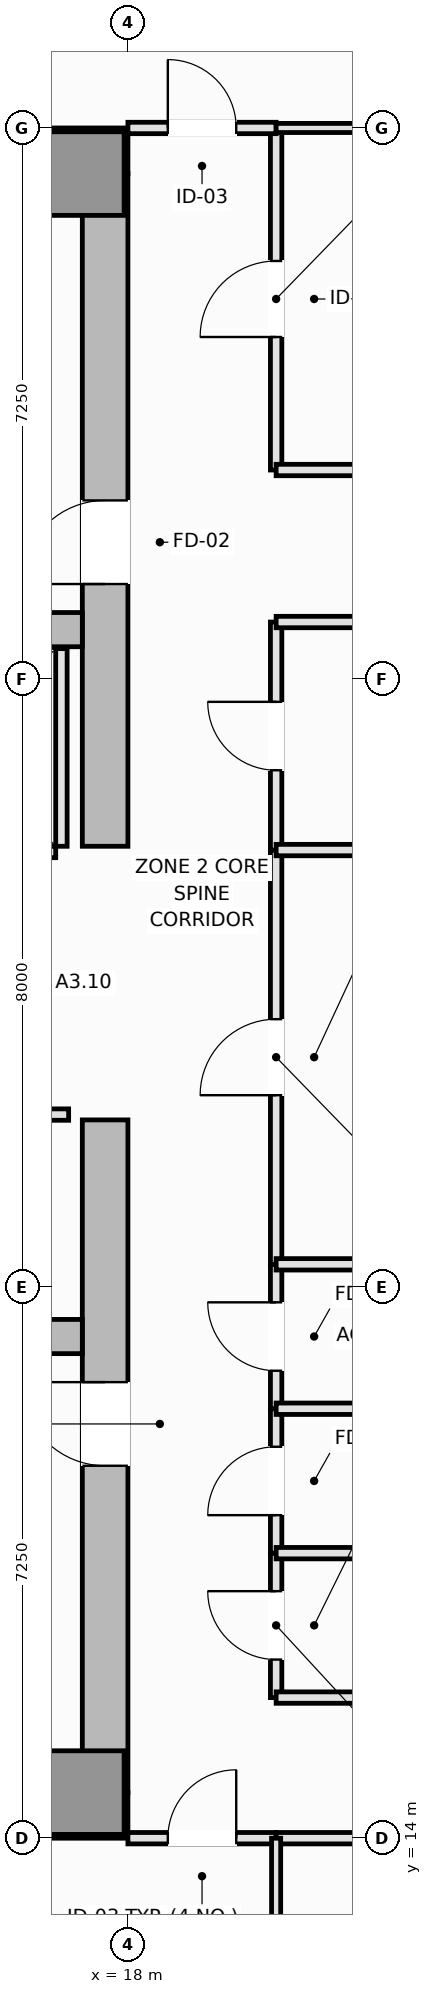
"""IFC4 building model, lengths in metres.
Left out: names, types, materials, properties, quantities, classifications, styles, units other than length and angle.
Written with IfcOpenShell. Run it as: python <this file> out.ifc"""

import sys

from ifc_helpers import new_model, si_unit, direction, frame, frame_2d, origin, origin_2d, place, context, subcontext, project, spatial, rectangle, extrude, element, fill, save


model = new_model("IFC4")
c1 = context("Model", 3, precision=1e-05, world=origin(), true_north=direction((0.0, 1.0)))
c2 = subcontext(c1, "Body", "Model", "MODEL_VIEW")
j1 = project(units=[si_unit("LENGTHUNIT", "METRE"), si_unit("PLANEANGLEUNIT", "RADIAN")], contexts=[c1])
p1 = place(None, origin())
s1 = spatial("IfcSite", under=j1, at=p1, CompositionType="ELEMENT")
p2 = place(p1, origin())
s2 = spatial("IfcBuilding", under=s1, at=p2, CompositionType="ELEMENT")
p3 = place(p2, frame((0.0, 0.0, 148.4)))
s3 = spatial("IfcBuildingStorey", under=s2, at=p3, CompositionType="ELEMENT", Elevation=148.4)
for number, where, z_axis, x_axis in (
    (1, (4.5, 14.3, 0.0), (0.0, 0.0, 1.0), (1.0, 0.0, 0.0)),
    (2, (4.5, 36.2, 0.0), (0.0, 0.0, 1.0), (1.0, 0.0, 0.0)),
):
    element("IfcWall", number, at=place(p3, frame(where, z_axis=z_axis, x_axis=x_axis)), inside=s3, PredefinedType="SHEAR", context=c2, shape_type="SweptSolid", body=[
        extrude(rectangle(XDim=13.5, YDim=0.6, at=frame_2d((6.75, 0.0))), origin(), (0.0, 0.0, 1.0), 3.55),
    ])
p4 = place(p3, frame((17.7, 14.6, 0.0), z_axis=(0.0, 0.0, 1.0), x_axis=(0.0, 1.0, 0.0)))
e3 = element("IfcWall", 3, at=p4, inside=s3, PredefinedType="SHEAR", context=c2, shape_type="SweptSolid", body=[
    extrude(rectangle(XDim=8.85, YDim=0.6, at=frame_2d((4.425, 0.0))), origin(), (0.0, 0.0, 1.0), 3.55),
])
p5 = place(p4, frame((4.3, 0.0, 0.0)))
e4 = element("IfcOpeningElement", 4, at=p5, cuts=e3, PredefinedType="OPENING", context=c2, shape_type="SweptSolid", body=[
    extrude(rectangle(XDim=1.1, YDim=2.15, at=frame_2d((0.55, 1.075))), frame((0.0, 0.31, 0.0), z_axis=(0.0, -1.0, 0.0), x_axis=(1.0, 0.0, 0.0)), (0.0, 0.0, 1.0), 0.62),
])
p6 = place(p3, frame((17.7, 27.05, 0.0), z_axis=(0.0, 0.0, 1.0), x_axis=(0.0, 1.0, 0.0)))
e5 = element("IfcWall", 5, at=p6, inside=s3, PredefinedType="SHEAR", context=c2, shape_type="SweptSolid", body=[
    extrude(rectangle(XDim=8.85, YDim=0.6, at=frame_2d((4.425, 0.0))), origin(), (0.0, 0.0, 1.0), 3.55),
])
p7 = place(p6, frame((3.45, 0.0, 0.0)))
e6 = element("IfcOpeningElement", 6, at=p7, cuts=e5, PredefinedType="OPENING", context=c2, shape_type="SweptSolid", body=[
    extrude(rectangle(XDim=1.1, YDim=2.15, at=frame_2d((0.55, 1.075))), frame((0.0, 0.31, 0.0), z_axis=(0.0, -1.0, 0.0), x_axis=(1.0, 0.0, 0.0)), (0.0, 0.0, 1.0), 0.62),
])
for number, where, z_axis, x_axis in (
    (7, (5.1, 20.6, 0.0), (0.0, 0.0, 1.0), (1.0, 0.0, 0.0)),
    (8, (5.1, 29.9, 0.0), (0.0, 0.0, 1.0), (1.0, 0.0, 0.0)),
):
    element("IfcWall", number, at=place(p3, frame(where, z_axis=z_axis, x_axis=x_axis)), inside=s3, PredefinedType="SHEAR", context=c2, shape_type="SweptSolid", body=[
        extrude(rectangle(XDim=12.3, YDim=0.45, at=frame_2d((6.15, 0.0))), origin(), (0.0, 0.0, 1.0), 3.55),
    ])
for number, where, z_axis, x_axis in (
    (9, (17.4, 14.6, 0.0), (0.0, 0.0, 1.0), (1.0, 0.0, 0.0)),
    (10, (17.4, 35.9, 0.0), (0.0, 0.0, 1.0), (1.0, 0.0, 0.0)),
):
    element("IfcColumn", number, at=place(p3, frame(where, z_axis=z_axis, x_axis=x_axis)), inside=s3, PredefinedType="PILASTER", context=c2, shape_type="SweptSolid", body=[
        extrude(rectangle(XDim=1.1, YDim=1.1, at=origin_2d()), origin(), (0.0, 0.0, 1.0), 3.55),
    ])
p8 = place(p3, frame((14.5, 26.975, 0.0), z_axis=(0.0, 0.0, 1.0), x_axis=(1.0, 0.0, 0.0)))
e11 = element("IfcWall", 11, at=p8, inside=s3, PredefinedType="PARTITIONING", context=c2, shape_type="SweptSolid", body=[
    extrude(rectangle(XDim=2.55, YDim=0.15, at=frame_2d((1.275, 0.0))), origin(), (0.0, 0.0, 1.0), 3.37),
])
p9 = place(p8, frame((0.625, 0.0, 0.0)))
e12 = element("IfcOpeningElement", 12, at=p9, cuts=e11, PredefinedType="OPENING", context=c2, shape_type="SweptSolid", body=[
    extrude(rectangle(XDim=1.3, YDim=2.2, at=frame_2d((0.65, 1.1))), frame((0.0, 0.085, 0.0), z_axis=(0.0, -1.0, 0.0), x_axis=(1.0, 0.0, 0.0)), (0.0, 0.0, 1.0), 0.17),
])
p10 = place(p3, frame((17.125, 27.05, 0.0), z_axis=(0.0, 0.0, 1.0), x_axis=(0.0, 1.0, 0.0)))
e13 = element("IfcWall", 13, at=p10, inside=s3, PredefinedType="PARTITIONING", context=c2, shape_type="SweptSolid", body=[
    extrude(rectangle(XDim=2.6, YDim=0.15, at=frame_2d((1.3, 0.0))), origin(), (0.0, 0.0, 1.0), 3.37),
])
p11 = place(p3, frame((14.33, 23.52, 0.0), z_axis=(0.0, 0.0, 1.0), x_axis=(1.0, 0.0, 0.0)))
e14 = element("IfcWall", 14, at=p11, inside=s3, PredefinedType="PARTITIONING", context=c2, shape_type="SweptSolid", body=[
    extrude(rectangle(XDim=2.89, YDim=0.15, at=frame_2d((1.445, 0.0))), origin(), (0.0, 0.0, 1.0), 3.37),
])
p12 = place(p11, frame((1.053, 0.0, 0.0)))
e15 = element("IfcOpeningElement", 15, at=p12, cuts=e14, PredefinedType="OPENING", context=c2, shape_type="SweptSolid", body=[
    extrude(rectangle(XDim=0.9, YDim=2.1, at=frame_2d((0.45, 1.05))), frame((0.0, 0.085, 0.0), z_axis=(0.0, -1.0, 0.0), x_axis=(1.0, 0.0, 0.0)), (0.0, 0.0, 1.0), 0.17),
])
p13 = place(p3, frame((19.95, 15.85, 0.0), z_axis=(0.0, 0.0, 1.0), x_axis=(0.0, 1.0, 0.0)))
e16 = element("IfcWall", 16, at=p13, inside=s3, PredefinedType="PLUMBINGWALL", context=c2, shape_type="SweptSolid", body=[
    extrude(rectangle(XDim=1.9, YDim=0.15, at=frame_2d((0.95, 0.0))), origin(), (0.0, 0.0, 1.0), 3.37),
])
p14 = place(p13, frame((0.5, 0.0, 0.0)))
e17 = element("IfcOpeningElement", 17, at=p14, cuts=e16, PredefinedType="OPENING", context=c2, shape_type="SweptSolid", body=[
    extrude(rectangle(XDim=0.9, YDim=2.1, at=frame_2d((0.45, 1.05))), frame((0.0, 0.085, 0.0), z_axis=(0.0, -1.0, 0.0), x_axis=(1.0, 0.0, 0.0)), (0.0, 0.0, 1.0), 0.17),
])
p15 = place(p3, frame((19.95, 17.75, 0.0), z_axis=(0.0, 0.0, 1.0), x_axis=(0.0, 1.0, 0.0)))
e18 = element("IfcWall", 18, at=p15, inside=s3, PredefinedType="PLUMBINGWALL", context=c2, shape_type="SweptSolid", body=[
    extrude(rectangle(XDim=1.9, YDim=0.15, at=frame_2d((0.95, 0.0))), origin(), (0.0, 0.0, 1.0), 3.37),
])
p16 = place(p15, frame((0.5, 0.0, 0.0)))
e19 = element("IfcOpeningElement", 19, at=p16, cuts=e18, PredefinedType="OPENING", context=c2, shape_type="SweptSolid", body=[
    extrude(rectangle(XDim=0.9, YDim=2.1, at=frame_2d((0.45, 1.05))), frame((0.0, 0.085, 0.0), z_axis=(0.0, -1.0, 0.0), x_axis=(1.0, 0.0, 0.0)), (0.0, 0.0, 1.0), 0.17),
])
p17 = place(p3, frame((19.95, 19.65, 0.0), z_axis=(0.0, 0.0, 1.0), x_axis=(0.0, 1.0, 0.0)))
e20 = element("IfcWall", 20, at=p17, inside=s3, PredefinedType="PLUMBINGWALL", context=c2, shape_type="SweptSolid", body=[
    extrude(rectangle(XDim=1.9, YDim=0.15, at=frame_2d((0.95, 0.0))), origin(), (0.0, 0.0, 1.0), 3.37),
])
p18 = place(p17, frame((0.5, 0.0, 0.0)))
e21 = element("IfcOpeningElement", 21, at=p18, cuts=e20, PredefinedType="OPENING", context=c2, shape_type="SweptSolid", body=[
    extrude(rectangle(XDim=0.9, YDim=2.1, at=frame_2d((0.45, 1.05))), frame((0.0, 0.085, 0.0), z_axis=(0.0, -1.0, 0.0), x_axis=(1.0, 0.0, 0.0)), (0.0, 0.0, 1.0), 0.17),
])
p19 = place(p3, frame((19.95, 21.55, 0.0), z_axis=(0.0, 0.0, 1.0), x_axis=(0.0, 1.0, 0.0)))
e22 = element("IfcWall", 22, at=p19, inside=s3, PredefinedType="PARTITIONING", context=c2, shape_type="SweptSolid", body=[
    extrude(rectangle(XDim=5.45, YDim=0.15, at=frame_2d((2.725, 0.0))), origin(), (0.0, 0.0, 1.0), 3.37),
])
p20 = place(p19, frame((2.225, 0.0, 0.0)))
e23 = element("IfcOpeningElement", 23, at=p20, cuts=e22, PredefinedType="OPENING", context=c2, shape_type="SweptSolid", body=[
    extrude(rectangle(XDim=1.0, YDim=2.15, at=frame_2d((0.5, 1.075))), frame((0.0, 0.085, 0.0), z_axis=(0.0, -1.0, 0.0), x_axis=(1.0, 0.0, 0.0)), (0.0, 0.0, 1.0), 0.17),
])
p21 = place(p3, frame((19.95, 27.0, 0.0), z_axis=(0.0, 0.0, 1.0), x_axis=(0.0, 1.0, 0.0)))
e24 = element("IfcWall", 24, at=p21, inside=s3, PredefinedType="PLUMBINGWALL", context=c2, shape_type="SweptSolid", body=[
    extrude(rectangle(XDim=3.0, YDim=0.15, at=frame_2d((1.5, 0.0))), origin(), (0.0, 0.0, 1.0), 3.37),
])
p22 = place(p21, frame((1.05, 0.0, 0.0)))
e25 = element("IfcOpeningElement", 25, at=p22, cuts=e24, PredefinedType="OPENING", context=c2, shape_type="SweptSolid", body=[
    extrude(rectangle(XDim=0.9, YDim=2.1, at=frame_2d((0.45, 1.05))), frame((0.0, 0.085, 0.0), z_axis=(0.0, -1.0, 0.0), x_axis=(1.0, 0.0, 0.0)), (0.0, 0.0, 1.0), 0.17),
])
p23 = place(p3, frame((19.95, 32.0, 0.0), z_axis=(0.0, 0.0, 1.0), x_axis=(0.0, 1.0, 0.0)))
e26 = element("IfcWall", 26, at=p23, inside=s3, PredefinedType="PARTITIONING", context=c2, shape_type="SweptSolid", body=[
    extrude(rectangle(XDim=4.5, YDim=0.15, at=frame_2d((2.25, 0.0))), origin(), (0.0, 0.0, 1.0), 3.37),
])
p24 = place(p23, frame((1.75, 0.0, 0.0)))
e27 = element("IfcOpeningElement", 27, at=p24, cuts=e26, PredefinedType="OPENING", context=c2, shape_type="SweptSolid", body=[
    extrude(rectangle(XDim=1.0, YDim=2.15, at=frame_2d((0.5, 1.075))), frame((0.0, 0.085, 0.0), z_axis=(0.0, -1.0, 0.0), x_axis=(1.0, 0.0, 0.0)), (0.0, 0.0, 1.0), 0.17),
])
p25 = place(p3, frame((18.0, 14.0, 0.0), z_axis=(0.0, 0.0, 1.0), x_axis=(1.0, 0.0, 0.0)))
e28 = element("IfcWall", 28, at=p25, inside=s3, PredefinedType="PARTITIONING", context=c2, shape_type="SweptSolid", body=[
    extrude(rectangle(XDim=1.95, YDim=0.15, at=frame_2d((0.975, 0.0))), origin(), (0.0, 0.0, 1.0), 3.37),
])
p26 = place(p25, frame((0.525, 0.0, 0.0)))
e29 = element("IfcOpeningElement", 29, at=p26, cuts=e28, PredefinedType="OPENING", context=c2, shape_type="SweptSolid", body=[
    extrude(rectangle(XDim=0.9, YDim=2.1, at=frame_2d((0.45, 1.05))), frame((0.0, 0.085, 0.0), z_axis=(0.0, -1.0, 0.0), x_axis=(1.0, 0.0, 0.0)), (0.0, 0.0, 1.0), 0.17),
])
p27 = place(p3, frame((18.0, 36.5, 0.0), z_axis=(0.0, 0.0, 1.0), x_axis=(1.0, 0.0, 0.0)))
e30 = element("IfcWall", 30, at=p27, inside=s3, PredefinedType="PARTITIONING", context=c2, shape_type="SweptSolid", body=[
    extrude(rectangle(XDim=1.95, YDim=0.15, at=frame_2d((0.975, 0.0))), origin(), (0.0, 0.0, 1.0), 3.37),
])
p28 = place(p27, frame((0.525, 0.0, 0.0)))
e31 = element("IfcOpeningElement", 31, at=p28, cuts=e30, PredefinedType="OPENING", context=c2, shape_type="SweptSolid", body=[
    extrude(rectangle(XDim=0.9, YDim=2.1, at=frame_2d((0.45, 1.05))), frame((0.0, 0.085, 0.0), z_axis=(0.0, -1.0, 0.0), x_axis=(1.0, 0.0, 0.0)), (0.0, 0.0, 1.0), 0.17),
])
p29 = place(p3, frame((19.95, 30.0, 0.0), z_axis=(0.0, 0.0, 1.0), x_axis=(1.0, 0.0, 0.0)))
e32 = element("IfcWall", 32, at=p29, inside=s3, PredefinedType="PLUMBINGWALL", context=c2, shape_type="SweptSolid", body=[
    extrude(rectangle(XDim=3.25, YDim=0.15, at=frame_2d((1.625, 0.0))), origin(), (0.0, 0.0, 1.0), 3.37),
])
p30 = place(p3, frame((19.95, 32.0, 0.0), z_axis=(0.0, 0.0, 1.0), x_axis=(1.0, 0.0, 0.0)))
e33 = element("IfcWall", 33, at=p30, inside=s3, PredefinedType="PARTITIONING", context=c2, shape_type="SweptSolid", body=[
    extrude(rectangle(XDim=7.55, YDim=0.15, at=frame_2d((3.775, 0.0))), origin(), (0.0, 0.0, 1.0), 2.77),
])
p31 = place(p3, frame((19.95, 15.85, 0.0), z_axis=(0.0, 0.0, 1.0), x_axis=(1.0, 0.0, 0.0)))
e34 = element("IfcWall", 34, at=p31, inside=s3, PredefinedType="PLUMBINGWALL", context=c2, shape_type="SweptSolid", body=[
    extrude(rectangle(XDim=3.65, YDim=0.15, at=frame_2d((1.825, 0.0))), origin(), (0.0, 0.0, 1.0), 3.37),
])
p32 = place(p3, frame((19.95, 14.0, 0.0), z_axis=(0.0, 0.0, 1.0), x_axis=(1.0, 0.0, 0.0)))
e35 = element("IfcWall", 35, at=p32, inside=s3, PredefinedType="PARTITIONING", context=c2, shape_type="SweptSolid", body=[
    extrude(rectangle(XDim=7.55, YDim=0.15, at=frame_2d((3.775, 0.0))), origin(), (0.0, 0.0, 1.0), 3.37),
])
p33 = place(p32, frame((3.275, 0.0, 0.0)))
e36 = element("IfcOpeningElement", 36, at=p33, cuts=e35, PredefinedType="OPENING", context=c2, shape_type="SweptSolid", body=[
    extrude(rectangle(XDim=1.0, YDim=2.15, at=frame_2d((0.5, 1.075))), frame((0.0, 0.085, 0.0), z_axis=(0.0, -1.0, 0.0), x_axis=(1.0, 0.0, 0.0)), (0.0, 0.0, 1.0), 0.17),
])
for number, where, z_axis, x_axis in (
    (37, (19.95, 17.75, 0.0), (0.0, 0.0, 1.0), (1.0, 0.0, 0.0)),
    (38, (19.95, 19.65, 0.0), (0.0, 0.0, 1.0), (1.0, 0.0, 0.0)),
    (39, (19.95, 21.55, 0.0), (0.0, 0.0, 1.0), (1.0, 0.0, 0.0)),
):
    element("IfcWall", number, at=place(p3, frame(where, z_axis=z_axis, x_axis=x_axis)), inside=s3, PredefinedType="PLUMBINGWALL", context=c2, shape_type="SweptSolid", body=[
        extrude(rectangle(XDim=3.65, YDim=0.15, at=frame_2d((1.825, 0.0))), origin(), (0.0, 0.0, 1.0), 3.37),
    ])
p34 = place(p3, frame((19.95, 27.0, 0.0), z_axis=(0.0, 0.0, 1.0), x_axis=(1.0, 0.0, 0.0)))
e40 = element("IfcWall", 40, at=p34, inside=s3, PredefinedType="PLUMBINGWALL", context=c2, shape_type="SweptSolid", body=[
    extrude(rectangle(XDim=3.25, YDim=0.15, at=frame_2d((1.625, 0.0))), origin(), (0.0, 0.0, 1.0), 3.37),
])
p35 = place(p3, frame((19.95, 36.5, 0.0), z_axis=(0.0, 0.0, 1.0), x_axis=(1.0, 0.0, 0.0)))
e41 = element("IfcWall", 41, at=p35, inside=s3, PredefinedType="PARTITIONING", context=c2, shape_type="SweptSolid", body=[
    extrude(rectangle(XDim=7.55, YDim=0.12, at=frame_2d((3.775, 0.0))), origin(), (0.0, 0.0, 1.0), 3.37),
])
p36 = place(p3, frame((19.95, 3.51, 0.0), z_axis=(0.0, 0.0, 1.0), x_axis=(0.0, 1.0, 0.0)))
e42 = element("IfcWall", 42, at=p36, inside=s3, PredefinedType="PARTITIONING", context=c2, shape_type="SweptSolid", body=[
    extrude(rectangle(XDim=10.49, YDim=0.12, at=frame_2d((5.245, 0.0))), origin(), (0.0, 0.0, 1.0), 3.37),
])
p37 = place(p5, origin())
e43 = element("IfcDoor", 43, at=p37, inside=s3, OperationType="SINGLE_SWING_RIGHT", PredefinedType="DOOR", context=c2, shape_type="SweptSolid", body=[
    extrude(rectangle(XDim=1.1, YDim=2.15, at=frame_2d((0.55, 1.075))), frame((0.0, 0.025, 0.0), z_axis=(0.0, -1.0, 0.0), x_axis=(1.0, 0.0, 0.0)), (0.0, 0.0, 1.0), 0.05),
])
fill(e4, e43)
p38 = place(p7, origin())
e44 = element("IfcDoor", 44, at=p38, inside=s3, OperationType="SINGLE_SWING_LEFT", PredefinedType="DOOR", context=c2, shape_type="SweptSolid", body=[
    extrude(rectangle(XDim=1.1, YDim=2.15, at=frame_2d((0.55, 1.075))), frame((0.0, 0.025, 0.0), z_axis=(0.0, -1.0, 0.0), x_axis=(1.0, 0.0, 0.0)), (0.0, 0.0, 1.0), 0.05),
])
fill(e6, e44)
p39 = place(p14, origin())
e45 = element("IfcDoor", 45, at=p39, inside=s3, OperationType="SINGLE_SWING_RIGHT", PredefinedType="DOOR", context=c2, shape_type="SweptSolid", body=[
    extrude(rectangle(XDim=0.9, YDim=2.1, at=frame_2d((0.45, 1.05))), frame((0.0, 0.025, 0.0), z_axis=(0.0, -1.0, 0.0), x_axis=(1.0, 0.0, 0.0)), (0.0, 0.0, 1.0), 0.05),
])
fill(e17, e45)
p40 = place(p16, origin())
e46 = element("IfcDoor", 46, at=p40, inside=s3, OperationType="SINGLE_SWING_LEFT", PredefinedType="DOOR", context=c2, shape_type="SweptSolid", body=[
    extrude(rectangle(XDim=0.9, YDim=2.1, at=frame_2d((0.45, 1.05))), frame((0.0, 0.025, 0.0), z_axis=(0.0, -1.0, 0.0), x_axis=(1.0, 0.0, 0.0)), (0.0, 0.0, 1.0), 0.05),
])
fill(e19, e46)
p41 = place(p18, origin())
e47 = element("IfcDoor", 47, at=p41, inside=s3, OperationType="SINGLE_SWING_RIGHT", PredefinedType="DOOR", context=c2, shape_type="SweptSolid", body=[
    extrude(rectangle(XDim=0.9, YDim=2.1, at=frame_2d((0.45, 1.05))), frame((0.0, 0.025, 0.0), z_axis=(0.0, -1.0, 0.0), x_axis=(1.0, 0.0, 0.0)), (0.0, 0.0, 1.0), 0.05),
])
fill(e21, e47)
p42 = place(p20, origin())
e48 = element("IfcDoor", 48, at=p42, inside=s3, OperationType="SINGLE_SWING_LEFT", PredefinedType="DOOR", context=c2, shape_type="SweptSolid", body=[
    extrude(rectangle(XDim=1.0, YDim=2.15, at=frame_2d((0.5, 1.075))), frame((0.0, 0.025, 0.0), z_axis=(0.0, -1.0, 0.0), x_axis=(1.0, 0.0, 0.0)), (0.0, 0.0, 1.0), 0.05),
])
fill(e23, e48)
p43 = place(p22, origin())
e49 = element("IfcDoor", 49, at=p43, inside=s3, OperationType="SINGLE_SWING_RIGHT", PredefinedType="DOOR", context=c2, shape_type="SweptSolid", body=[
    extrude(rectangle(XDim=0.9, YDim=2.1, at=frame_2d((0.45, 1.05))), frame((0.0, 0.025, 0.0), z_axis=(0.0, -1.0, 0.0), x_axis=(1.0, 0.0, 0.0)), (0.0, 0.0, 1.0), 0.05),
])
fill(e25, e49)
p44 = place(p24, origin())
e50 = element("IfcDoor", 50, at=p44, inside=s3, OperationType="SINGLE_SWING_LEFT", PredefinedType="DOOR", context=c2, shape_type="SweptSolid", body=[
    extrude(rectangle(XDim=1.0, YDim=2.15, at=frame_2d((0.5, 1.075))), frame((0.0, 0.025, 0.0), z_axis=(0.0, -1.0, 0.0), x_axis=(1.0, 0.0, 0.0)), (0.0, 0.0, 1.0), 0.05),
])
fill(e27, e50)
p45 = place(p26, origin())
e51 = element("IfcDoor", 51, at=p45, inside=s3, OperationType="SINGLE_SWING_RIGHT", PredefinedType="DOOR", context=c2, shape_type="SweptSolid", body=[
    extrude(rectangle(XDim=0.9, YDim=2.1, at=frame_2d((0.45, 1.05))), frame((0.0, 0.025, 0.0), z_axis=(0.0, -1.0, 0.0), x_axis=(1.0, 0.0, 0.0)), (0.0, 0.0, 1.0), 0.05),
])
fill(e29, e51)
p46 = place(p28, origin())
e52 = element("IfcDoor", 52, at=p46, inside=s3, OperationType="SINGLE_SWING_LEFT", PredefinedType="DOOR", context=c2, shape_type="SweptSolid", body=[
    extrude(rectangle(XDim=0.9, YDim=2.1, at=frame_2d((0.45, 1.05))), frame((0.0, 0.025, 0.0), z_axis=(0.0, -1.0, 0.0), x_axis=(1.0, 0.0, 0.0)), (0.0, 0.0, 1.0), 0.05),
])
fill(e31, e52)
save(model, sys.argv[1])
